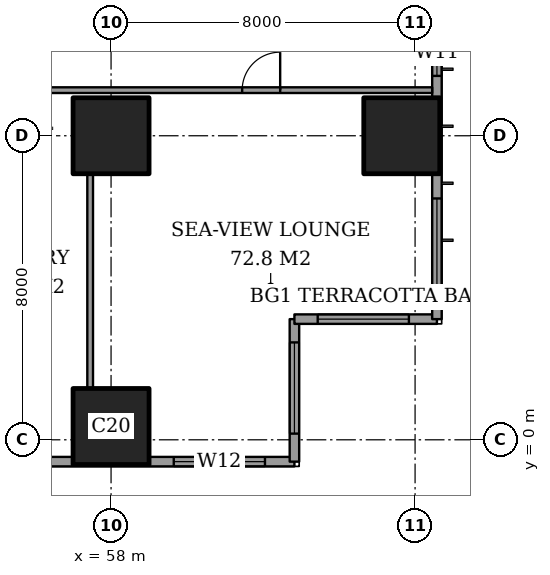
"""IFC4 building model, lengths in metres.
Left out: names, types, materials, properties, quantities, classifications, styles, units other than length and angle.
Written with IfcOpenShell. Run it as: python <this file> out.ifc"""

import sys

from ifc_helpers import new_model, si_unit, direction, frame, frame_2d, origin, origin_2d, place, context, subcontext, project, spatial, rectangle, extrude, element, fill, save


model = new_model("IFC4")
c1 = context("Model", 3, precision=1e-05, world=origin(), true_north=direction((0.0, 1.0)))
c2 = subcontext(c1, "Body", "Model", "MODEL_VIEW")
j1 = project(units=[si_unit("LENGTHUNIT", "METRE"), si_unit("PLANEANGLEUNIT", "RADIAN")], contexts=[c1])
p1 = place(None, origin())
s1 = spatial("IfcSite", under=j1, at=p1, CompositionType="ELEMENT")
p2 = place(p1, origin())
s2 = spatial("IfcBuilding", under=s1, at=p2, CompositionType="ELEMENT")
p3 = place(p2, frame((0.0, 0.0, 121.4)))
s3 = spatial("IfcBuildingStorey", under=s2, at=p3, CompositionType="ELEMENT", Elevation=121.4)
for number, where, z_axis, x_axis in (
    (1, (58.0, 0.35, 0.0), (0.0, 0.0, 1.0), (1.0, 0.0, 0.0)),
    (2, (58.0, 8.0, 0.0), (0.0, 0.0, 1.0), (1.0, 0.0, 0.0)),
    (3, (65.65, 8.0, 0.0), (0.0, 0.0, 1.0), (1.0, 0.0, 0.0)),
):
    element("IfcColumn", number, at=place(p3, frame(where, z_axis=z_axis, x_axis=x_axis)), inside=s3, PredefinedType="COLUMN", context=c2, shape_type="SweptSolid", body=[
        extrude(rectangle(XDim=2.0, YDim=2.0, at=origin_2d()), origin(), (0.0, 0.0, 1.0), 3.6),
    ])
p4 = place(p3, frame((41.425, -0.575, 0.0), z_axis=(0.0, 0.0, 1.0), x_axis=(1.0, 0.0, 0.0)))
e4 = element("IfcWall", 4, at=p4, inside=s3, PredefinedType="SOLIDWALL", context=c2, shape_type="SweptSolid", body=[
    extrude(rectangle(XDim=21.4, YDim=0.25, at=frame_2d((10.7, 0.0))), origin(), (0.0, 0.0, 1.0), 3.6),
])
p5 = place(p4, frame((2.6, 0.0, 0.4)))
e5 = element("IfcOpeningElement", 5, at=p5, cuts=e4, PredefinedType="OPENING", context=c2, shape_type="SweptSolid", body=[
    extrude(rectangle(XDim=1.2, YDim=2.2, at=frame_2d((0.6, 1.1))), frame((0.0, 0.135, 0.0), z_axis=(0.0, -1.0, 0.0), x_axis=(1.0, 0.0, 0.0)), (0.0, 0.0, 1.0), 0.27),
])
p6 = place(p4, frame((5.425, 0.0, 0.4)))
e6 = element("IfcOpeningElement", 6, at=p6, cuts=e4, PredefinedType="OPENING", context=c2, shape_type="SweptSolid", body=[
    extrude(rectangle(XDim=1.2, YDim=2.2, at=frame_2d((0.6, 1.1))), frame((0.0, 0.135, 0.0), z_axis=(0.0, -1.0, 0.0), x_axis=(1.0, 0.0, 0.0)), (0.0, 0.0, 1.0), 0.27),
])
p7 = place(p4, frame((10.475, 0.0, 0.4)))
e7 = element("IfcOpeningElement", 7, at=p7, cuts=e4, PredefinedType="OPENING", context=c2, shape_type="SweptSolid", body=[
    extrude(rectangle(XDim=1.2, YDim=2.2, at=frame_2d((0.6, 1.1))), frame((0.0, 0.135, 0.0), z_axis=(0.0, -1.0, 0.0), x_axis=(1.0, 0.0, 0.0)), (0.0, 0.0, 1.0), 0.27),
])
p8 = place(p4, frame((13.475, 0.0, 0.4)))
e8 = element("IfcOpeningElement", 8, at=p8, cuts=e4, PredefinedType="OPENING", context=c2, shape_type="SweptSolid", body=[
    extrude(rectangle(XDim=1.2, YDim=2.2, at=frame_2d((0.6, 1.1))), frame((0.0, 0.135, 0.0), z_axis=(0.0, -1.0, 0.0), x_axis=(1.0, 0.0, 0.0)), (0.0, 0.0, 1.0), 0.27),
])
p9 = place(p4, frame((18.225, 0.0, 0.4)))
e9 = element("IfcOpeningElement", 9, at=p9, cuts=e4, PredefinedType="OPENING", context=c2, shape_type="SweptSolid", body=[
    extrude(rectangle(XDim=2.4, YDim=2.2, at=frame_2d((1.2, 1.1))), frame((0.0, 0.135, 0.0), z_axis=(0.0, -1.0, 0.0), x_axis=(1.0, 0.0, 0.0)), (0.0, 0.0, 1.0), 0.27),
])
p10 = place(p3, frame((62.825, -0.575, 0.0), z_axis=(0.0, 0.0, 1.0), x_axis=(0.0, 1.0, 0.0)))
e10 = element("IfcWall", 10, at=p10, inside=s3, PredefinedType="SOLIDWALL", context=c2, shape_type="SweptSolid", body=[
    extrude(rectangle(XDim=3.75, YDim=0.25, at=frame_2d((1.875, 0.0))), origin(), (0.0, 0.0, 1.0), 3.6),
])
p11 = place(p10, frame((0.738, 0.0, 0.4)))
e11 = element("IfcOpeningElement", 11, at=p11, cuts=e10, PredefinedType="OPENING", context=c2, shape_type="SweptSolid", body=[
    extrude(rectangle(XDim=2.4, YDim=2.2, at=frame_2d((1.2, 1.1))), frame((0.0, 0.135, 0.0), z_axis=(0.0, -1.0, 0.0), x_axis=(1.0, 0.0, 0.0)), (0.0, 0.0, 1.0), 0.27),
])
p12 = place(p3, frame((62.825, 3.175, 0.0), z_axis=(0.0, 0.0, 1.0), x_axis=(1.0, 0.0, 0.0)))
e12 = element("IfcWall", 12, at=p12, inside=s3, PredefinedType="SOLIDWALL", context=c2, shape_type="SweptSolid", body=[
    extrude(rectangle(XDim=3.75, YDim=0.25, at=frame_2d((1.875, 0.0))), origin(), (0.0, 0.0, 1.0), 3.6),
])
p13 = place(p12, frame((0.613, 0.0, 0.4)))
e13 = element("IfcOpeningElement", 13, at=p13, cuts=e12, PredefinedType="OPENING", context=c2, shape_type="SweptSolid", body=[
    extrude(rectangle(XDim=2.4, YDim=2.2, at=frame_2d((1.2, 1.1))), frame((0.0, 0.135, 0.0), z_axis=(0.0, -1.0, 0.0), x_axis=(1.0, 0.0, 0.0)), (0.0, 0.0, 1.0), 0.27),
])
p14 = place(p3, frame((66.575, 3.175, 0.0), z_axis=(0.0, 0.0, 1.0), x_axis=(0.0, 1.0, 0.0)))
e14 = element("IfcWall", 14, at=p14, inside=s3, PredefinedType="SOLIDWALL", context=c2, shape_type="SweptSolid", body=[
    extrude(rectangle(XDim=41.65, YDim=0.25, at=frame_2d((20.825, 0.0))), origin(), (0.0, 0.0, 1.0), 3.6),
])
p15 = place(p14, frame((0.775, 0.0, 0.4)))
e15 = element("IfcOpeningElement", 15, at=p15, cuts=e14, PredefinedType="OPENING", context=c2, shape_type="SweptSolid", body=[
    extrude(rectangle(XDim=2.4, YDim=2.2, at=frame_2d((1.2, 1.1))), frame((0.0, 0.135, 0.0), z_axis=(0.0, -1.0, 0.0), x_axis=(1.0, 0.0, 0.0)), (0.0, 0.0, 1.0), 0.27),
])
p16 = place(p14, frame((6.4, 0.0, 0.4)))
e16 = element("IfcOpeningElement", 16, at=p16, cuts=e14, PredefinedType="OPENING", context=c2, shape_type="SweptSolid", body=[
    extrude(rectangle(XDim=1.2, YDim=2.2, at=frame_2d((0.6, 1.1))), frame((0.0, 0.135, 0.0), z_axis=(0.0, -1.0, 0.0), x_axis=(1.0, 0.0, 0.0)), (0.0, 0.0, 1.0), 0.27),
])
p17 = place(p14, frame((8.475, 0.0, 0.4)))
e17 = element("IfcOpeningElement", 17, at=p17, cuts=e14, PredefinedType="OPENING", context=c2, shape_type="SweptSolid", body=[
    extrude(rectangle(XDim=2.4, YDim=2.2, at=frame_2d((1.2, 1.1))), frame((0.0, 0.135, 0.0), z_axis=(0.0, -1.0, 0.0), x_axis=(1.0, 0.0, 0.0)), (0.0, 0.0, 1.0), 0.27),
])
p18 = place(p14, frame((15.775, 0.0, 0.4)))
e18 = element("IfcOpeningElement", 18, at=p18, cuts=e14, PredefinedType="OPENING", context=c2, shape_type="SweptSolid", body=[
    extrude(rectangle(XDim=2.4, YDim=2.2, at=frame_2d((1.2, 1.1))), frame((0.0, 0.135, 0.0), z_axis=(0.0, -1.0, 0.0), x_axis=(1.0, 0.0, 0.0)), (0.0, 0.0, 1.0), 0.27),
])
p19 = place(p14, frame((23.475, 0.0, 0.4)))
e19 = element("IfcOpeningElement", 19, at=p19, cuts=e14, PredefinedType="OPENING", context=c2, shape_type="SweptSolid", body=[
    extrude(rectangle(XDim=2.4, YDim=2.2, at=frame_2d((1.2, 1.1))), frame((0.0, 0.135, 0.0), z_axis=(0.0, -1.0, 0.0), x_axis=(1.0, 0.0, 0.0)), (0.0, 0.0, 1.0), 0.27),
])
p20 = place(p14, frame((30.975, 0.0, 0.4)))
e20 = element("IfcOpeningElement", 20, at=p20, cuts=e14, PredefinedType="OPENING", context=c2, shape_type="SweptSolid", body=[
    extrude(rectangle(XDim=2.4, YDim=2.2, at=frame_2d((1.2, 1.1))), frame((0.0, 0.135, 0.0), z_axis=(0.0, -1.0, 0.0), x_axis=(1.0, 0.0, 0.0)), (0.0, 0.0, 1.0), 0.27),
])
p21 = place(p14, frame((34.5, 0.0, 0.4)))
e21 = element("IfcOpeningElement", 21, at=p21, cuts=e14, PredefinedType="OPENING", context=c2, shape_type="SweptSolid", body=[
    extrude(rectangle(XDim=1.2, YDim=2.2, at=frame_2d((0.6, 1.1))), frame((0.0, 0.135, 0.0), z_axis=(0.0, -1.0, 0.0), x_axis=(1.0, 0.0, 0.0)), (0.0, 0.0, 1.0), 0.27),
])
p22 = place(p14, frame((38.475, 0.0, 0.4)))
e22 = element("IfcOpeningElement", 22, at=p22, cuts=e14, PredefinedType="OPENING", context=c2, shape_type="SweptSolid", body=[
    extrude(rectangle(XDim=2.4, YDim=2.2, at=frame_2d((1.2, 1.1))), frame((0.0, 0.135, 0.0), z_axis=(0.0, -1.0, 0.0), x_axis=(1.0, 0.0, 0.0)), (0.0, 0.0, 1.0), 0.27),
])
p23 = place(p3, frame((51.2, 9.2, 0.0), z_axis=(0.0, 0.0, 1.0), x_axis=(1.0, 0.0, 0.0)))
e23 = element("IfcWall", 23, at=p23, inside=s3, PredefinedType="PARTITIONING", context=c2, shape_type="SweptSolid", body=[
    extrude(rectangle(XDim=15.25, YDim=0.15, at=frame_2d((7.625, 0.0))), origin(), (0.0, 0.0, 1.0), 3.35),
])
p24 = place(p23, frame((10.25, 0.0, 0.0)))
e24 = element("IfcOpeningElement", 24, at=p24, cuts=e23, PredefinedType="OPENING", context=c2, shape_type="SweptSolid", body=[
    extrude(rectangle(XDim=1.0, YDim=2.1, at=frame_2d((0.5, 1.05))), frame((0.0, 0.085, 0.0), z_axis=(0.0, -1.0, 0.0), x_axis=(1.0, 0.0, 0.0)), (0.0, 0.0, 1.0), 0.17),
])
p25 = place(p23, frame((4.025, 0.0, 0.0)))
e25 = element("IfcOpeningElement", 25, at=p25, cuts=e23, PredefinedType="OPENING", context=c2, shape_type="SweptSolid", body=[
    extrude(rectangle(XDim=1.0, YDim=2.1, at=frame_2d((0.5, 1.05))), frame((0.0, 0.085, 0.0), z_axis=(0.0, -1.0, 0.0), x_axis=(1.0, 0.0, 0.0)), (0.0, 0.0, 1.0), 0.17),
])
p26 = place(p23, frame((0.9, 0.0, 0.0)))
e26 = element("IfcOpeningElement", 26, at=p26, cuts=e23, PredefinedType="OPENING", context=c2, shape_type="SweptSolid", body=[
    extrude(rectangle(XDim=1.0, YDim=2.1, at=frame_2d((0.5, 1.05))), frame((0.0, 0.085, 0.0), z_axis=(0.0, -1.0, 0.0), x_axis=(1.0, 0.0, 0.0)), (0.0, 0.0, 1.0), 0.17),
])
p27 = place(p3, frame((57.45, 1.35, 0.0), z_axis=(0.0, 0.0, 1.0), x_axis=(0.0, 1.0, 0.0)))
e27 = element("IfcWall", 27, at=p27, inside=s3, PredefinedType="PARTITIONING", context=c2, shape_type="SweptSolid", body=[
    extrude(rectangle(XDim=5.65, YDim=0.15, at=frame_2d((2.825, 0.0))), origin(), (0.0, 0.0, 1.0), 3.35),
])
p28 = place(p9, origin())
e28 = element("IfcWindow", 28, at=p28, inside=s3, PartitioningType="SINGLE_PANEL", PredefinedType="WINDOW", context=c2, shape_type="SweptSolid", body=[
    extrude(rectangle(XDim=2.4, YDim=2.2, at=frame_2d((1.2, 1.1))), frame((0.0, 0.03, 0.0), z_axis=(0.0, -1.0, 0.0), x_axis=(1.0, 0.0, 0.0)), (0.0, 0.0, 1.0), 0.06),
])
fill(e9, e28)
p29 = place(p11, origin())
e29 = element("IfcWindow", 29, at=p29, inside=s3, PartitioningType="SINGLE_PANEL", PredefinedType="WINDOW", context=c2, shape_type="SweptSolid", body=[
    extrude(rectangle(XDim=2.4, YDim=2.2, at=frame_2d((1.2, 1.1))), frame((0.0, 0.03, 0.0), z_axis=(0.0, -1.0, 0.0), x_axis=(1.0, 0.0, 0.0)), (0.0, 0.0, 1.0), 0.06),
])
fill(e11, e29)
p30 = place(p13, origin())
e30 = element("IfcWindow", 30, at=p30, inside=s3, PartitioningType="SINGLE_PANEL", PredefinedType="WINDOW", context=c2, shape_type="SweptSolid", body=[
    extrude(rectangle(XDim=2.4, YDim=2.2, at=frame_2d((1.2, 1.1))), frame((0.0, 0.03, 0.0), z_axis=(0.0, -1.0, 0.0), x_axis=(1.0, 0.0, 0.0)), (0.0, 0.0, 1.0), 0.06),
])
fill(e13, e30)
p31 = place(p15, origin())
e31 = element("IfcWindow", 31, at=p31, inside=s3, PartitioningType="SINGLE_PANEL", PredefinedType="WINDOW", context=c2, shape_type="SweptSolid", body=[
    extrude(rectangle(XDim=2.4, YDim=2.2, at=frame_2d((1.2, 1.1))), frame((0.0, 0.03, 0.0), z_axis=(0.0, -1.0, 0.0), x_axis=(1.0, 0.0, 0.0)), (0.0, 0.0, 1.0), 0.06),
])
fill(e15, e31)
p32 = place(p16, origin())
e32 = element("IfcWindow", 32, at=p32, inside=s3, PartitioningType="SINGLE_PANEL", PredefinedType="WINDOW", context=c2, shape_type="SweptSolid", body=[
    extrude(rectangle(XDim=1.2, YDim=2.2, at=frame_2d((0.6, 1.1))), frame((0.0, 0.03, 0.0), z_axis=(0.0, -1.0, 0.0), x_axis=(1.0, 0.0, 0.0)), (0.0, 0.0, 1.0), 0.06),
])
fill(e16, e32)
p33 = place(p24, origin())
e33 = element("IfcDoor", 33, at=p33, inside=s3, OperationType="SINGLE_SWING_LEFT", PredefinedType="DOOR", context=c2, shape_type="SweptSolid", body=[
    extrude(rectangle(XDim=1.0, YDim=2.1, at=frame_2d((0.5, 1.05))), frame((0.0, 0.025, 0.0), z_axis=(0.0, -1.0, 0.0), x_axis=(1.0, 0.0, 0.0)), (0.0, 0.0, 1.0), 0.05),
])
fill(e24, e33)
save(model, sys.argv[1])
